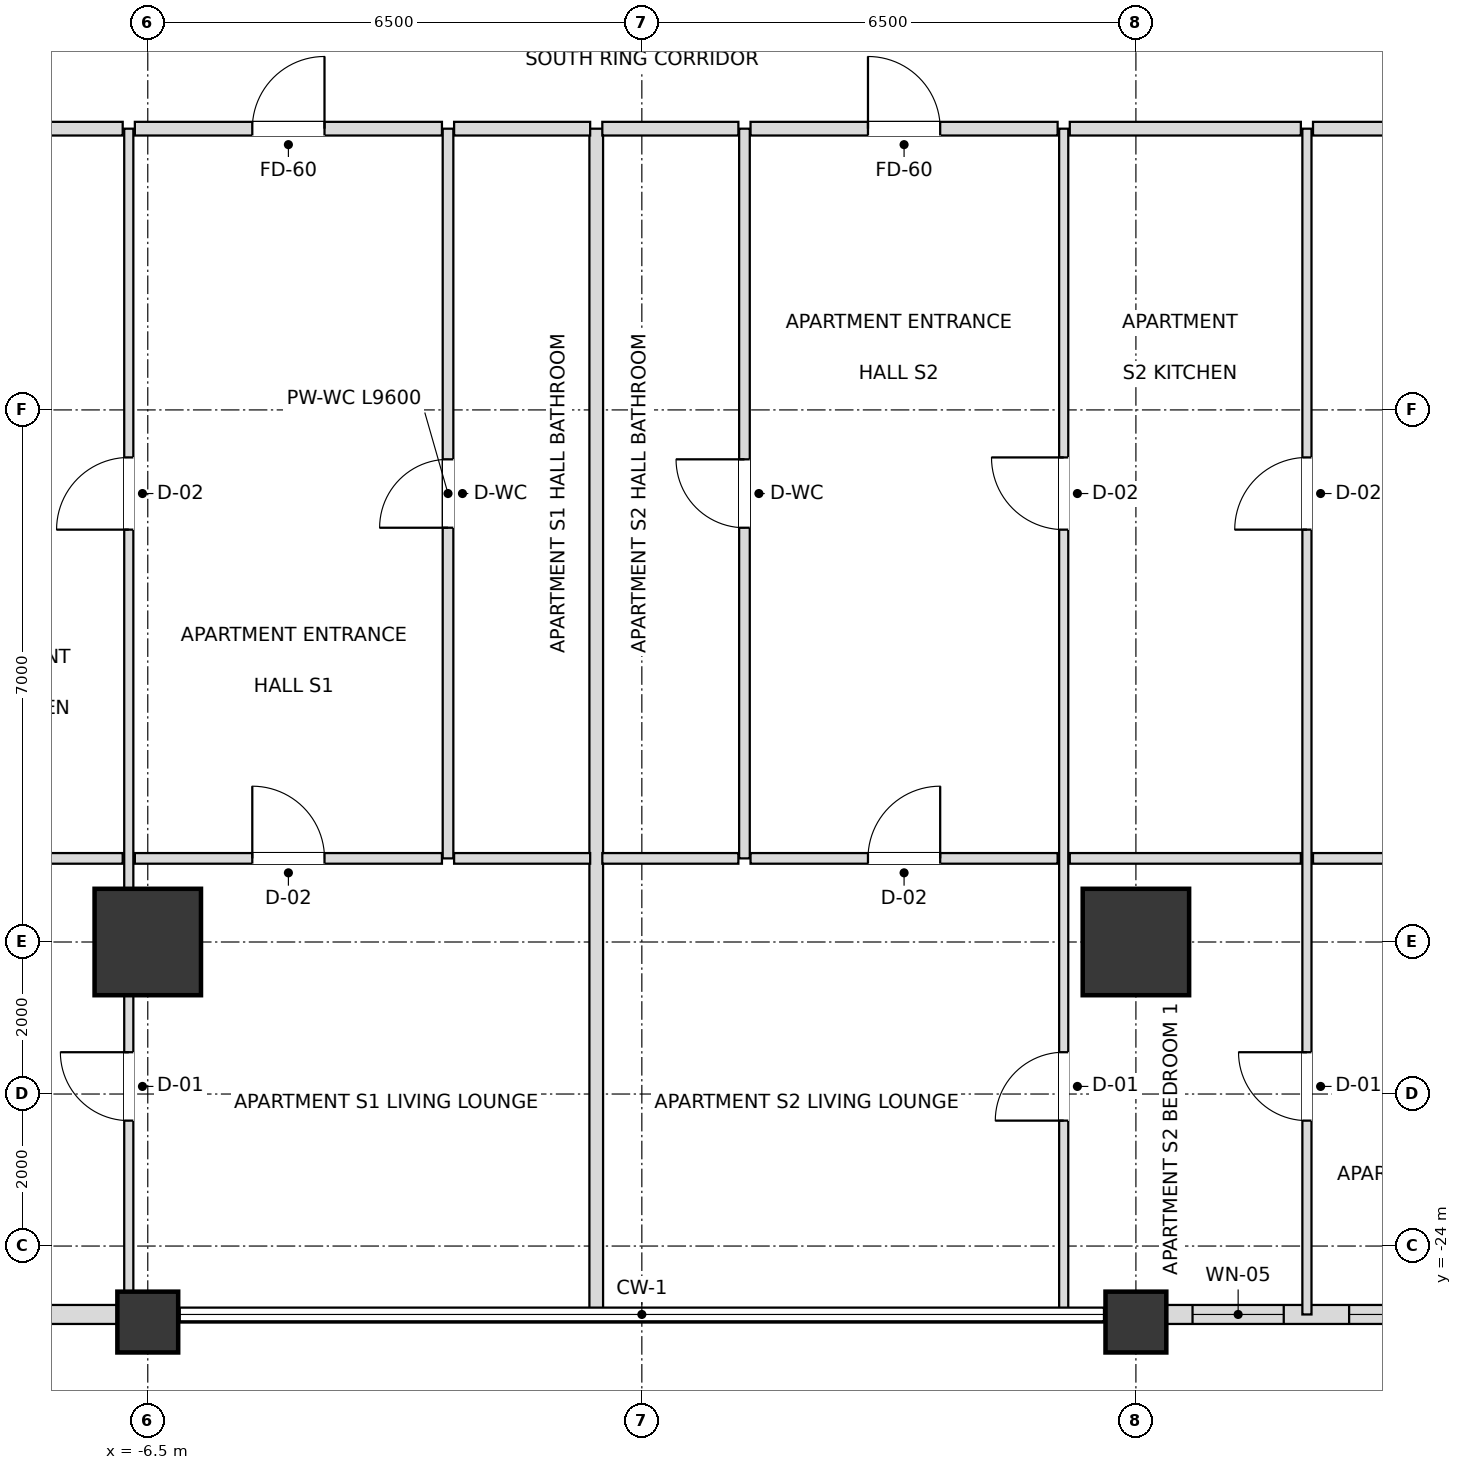
"""IFC4 building model, lengths in metres.
Left out: names, types, materials, properties, quantities, classifications, styles, units other than length and angle.
Written with IfcOpenShell. Run it as: python <this file> out.ifc"""

import sys

from ifc_helpers import new_model, si_unit, direction, frame, frame_2d, origin, origin_2d, place, context, subcontext, project, spatial, rectangle, extrude, element, fill, save


model = new_model("IFC4")
c1 = context("Model", 3, precision=1e-05, world=origin(), true_north=direction((0.0, 1.0)))
c2 = subcontext(c1, "Body", "Model", "MODEL_VIEW")
j1 = project(units=[si_unit("LENGTHUNIT", "METRE"), si_unit("PLANEANGLEUNIT", "RADIAN")], contexts=[c1])
p1 = place(None, origin())
s1 = spatial("IfcSite", under=j1, at=p1, CompositionType="ELEMENT")
p2 = place(p1, origin())
s2 = spatial("IfcBuilding", under=s1, at=p2, CompositionType="ELEMENT")
p3 = place(p2, frame((0.0, 0.0, 68.4)))
s3 = spatial("IfcBuildingStorey", under=s2, at=p3, CompositionType="ELEMENT", Elevation=68.4)
for number, where, z_axis, x_axis in (
    (1, (-6.5, -20.0, 0.0), (0.0, 0.0, 1.0), (1.0, 0.0, 0.0)),
    (2, (6.5, -20.0, 0.0), (0.0, 0.0, 1.0), (1.0, 0.0, 0.0)),
):
    element("IfcColumn", number, at=place(p3, frame(where, z_axis=z_axis, x_axis=x_axis)), inside=s3, PredefinedType="USERDEFINED", context=c2, shape_type="SweptSolid", body=[
        extrude(rectangle(XDim=1.4, YDim=1.4, at=origin_2d()), origin(), (0.0, 0.0, 1.0), 3.6),
    ])
for number, where, z_axis, x_axis in (
    (3, (-6.5, -25.0, 0.0), (0.0, 0.0, 1.0), (1.0, 0.0, 0.0)),
    (4, (6.5, -25.0, 0.0), (0.0, 0.0, 1.0), (1.0, 0.0, 0.0)),
):
    element("IfcColumn", number, at=place(p3, frame(where, z_axis=z_axis, x_axis=x_axis)), inside=s3, PredefinedType="COLUMN", context=c2, shape_type="SweptSolid", body=[
        extrude(rectangle(XDim=0.8, YDim=0.8, at=origin_2d()), origin(), (0.0, 0.0, 1.0), 3.6),
    ])
p4 = place(p3, frame((-11.105, -24.9, 0.0), z_axis=(0.0, 0.0, 1.0), x_axis=(1.0, 0.0, 0.0)))
e5 = element("IfcWall", 5, at=p4, inside=s3, PredefinedType="SOLIDWALL", context=c2, shape_type="SweptSolid", body=[
    extrude(rectangle(XDim=4.21, YDim=0.25, at=frame_2d((2.105, 0.0))), origin(), (0.0, 0.0, 1.0), 2.736),
])
p5 = place(p4, frame((1.205, 0.0, 0.72)))
e6 = element("IfcOpeningElement", 6, at=p5, cuts=e5, PredefinedType="OPENING", context=c2, shape_type="SweptSolid", body=[
    extrude(rectangle(XDim=1.8, YDim=1.68, at=frame_2d((0.9, 0.84))), frame((0.0, 0.135, 0.0), z_axis=(0.0, -1.0, 0.0), x_axis=(1.0, 0.0, 0.0)), (0.0, 0.0, 1.0), 0.27),
])
p6 = place(p3, frame((6.895, -24.9, 0.0), z_axis=(0.0, 0.0, 1.0), x_axis=(1.0, 0.0, 0.0)))
e7 = element("IfcWall", 7, at=p6, inside=s3, PredefinedType="SOLIDWALL", context=c2, shape_type="SweptSolid", body=[
    extrude(rectangle(XDim=4.21, YDim=0.25, at=frame_2d((2.105, 0.0))), origin(), (0.0, 0.0, 1.0), 2.736),
])
p7 = place(p6, frame((0.35, 0.0, 0.72)))
e8 = element("IfcOpeningElement", 8, at=p7, cuts=e7, PredefinedType="OPENING", context=c2, shape_type="SweptSolid", body=[
    extrude(rectangle(XDim=1.2, YDim=1.68, at=frame_2d((0.6, 0.84))), frame((0.0, 0.135, 0.0), z_axis=(0.0, -1.0, 0.0), x_axis=(1.0, 0.0, 0.0)), (0.0, 0.0, 1.0), 0.27),
])
p8 = place(p6, frame((2.41, 0.0, 0.72)))
e9 = element("IfcOpeningElement", 9, at=p8, cuts=e7, PredefinedType="OPENING", context=c2, shape_type="SweptSolid", body=[
    extrude(rectangle(XDim=1.2, YDim=1.68, at=frame_2d((0.6, 0.84))), frame((0.0, 0.135, 0.0), z_axis=(0.0, -1.0, 0.0), x_axis=(1.0, 0.0, 0.0)), (0.0, 0.0, 1.0), 0.27),
])
p9 = place(p3, frame((-6.75, -24.9, 0.0), z_axis=(0.0, 0.0, 1.0), x_axis=(0.0, 1.0, 0.0)))
e10 = element("IfcWall", 10, at=p9, inside=s3, PredefinedType="PARTITIONING", context=c2, shape_type="SweptSolid", body=[
    extrude(rectangle(XDim=15.6, YDim=0.12, at=frame_2d((7.8, 0.0))), origin(), (0.0, 0.0, 1.0), 2.816),
])
p10 = place(p9, frame((10.325, 0.0, 0.0)))
e11 = element("IfcOpeningElement", 11, at=p10, cuts=e10, PredefinedType="OPENING", context=c2, shape_type="SweptSolid", body=[
    extrude(rectangle(XDim=0.95, YDim=2.1, at=frame_2d((0.475, 1.05))), frame((0.0, 0.07, 0.0), z_axis=(0.0, -1.0, 0.0), x_axis=(1.0, 0.0, 0.0)), (0.0, 0.0, 1.0), 0.14),
])
p11 = place(p9, frame((2.55, 0.0, 0.0)))
e12 = element("IfcOpeningElement", 12, at=p11, cuts=e10, PredefinedType="OPENING", context=c2, shape_type="SweptSolid", body=[
    extrude(rectangle(XDim=0.9, YDim=2.1, at=frame_2d((0.45, 1.05))), frame((0.0, 0.07, 0.0), z_axis=(0.0, -1.0, 0.0), x_axis=(1.0, 0.0, 0.0)), (0.0, 0.0, 1.0), 0.14),
])
p12 = place(p3, frame((-2.55, -18.9, 0.0), z_axis=(0.0, 0.0, 1.0), x_axis=(0.0, 1.0, 0.0)))
e13 = element("IfcWall", 13, at=p12, inside=s3, PredefinedType="PARTITIONING", context=c2, shape_type="SweptSolid", body=[
    extrude(rectangle(XDim=9.6, YDim=0.14, at=frame_2d((4.8, 0.0))), origin(), (0.0, 0.0, 1.0), 2.948),
])
p13 = place(p12, frame((4.35, 0.0, 0.0)))
e14 = element("IfcOpeningElement", 14, at=p13, cuts=e13, PredefinedType="OPENING", context=c2, shape_type="SweptSolid", body=[
    extrude(rectangle(XDim=0.9, YDim=2.1, at=frame_2d((0.45, 1.05))), frame((0.0, 0.08, 0.0), z_axis=(0.0, -1.0, 0.0), x_axis=(1.0, 0.0, 0.0)), (0.0, 0.0, 1.0), 0.16),
])
p14 = place(p3, frame((-0.6, -24.9, 0.0), z_axis=(0.0, 0.0, 1.0), x_axis=(0.0, 1.0, 0.0)))
e15 = element("IfcWall", 15, at=p14, inside=s3, PredefinedType="PARTITIONING", context=c2, shape_type="SweptSolid", body=[
    extrude(rectangle(XDim=15.6, YDim=0.18, at=frame_2d((7.8, 0.0))), origin(), (0.0, 0.0, 1.0), 2.816),
])
p15 = place(p3, frame((1.35, -18.9, 0.0), z_axis=(0.0, 0.0, 1.0), x_axis=(0.0, 1.0, 0.0)))
e16 = element("IfcWall", 16, at=p15, inside=s3, PredefinedType="PARTITIONING", context=c2, shape_type="SweptSolid", body=[
    extrude(rectangle(XDim=9.6, YDim=0.14, at=frame_2d((4.8, 0.0))), origin(), (0.0, 0.0, 1.0), 2.948),
])
p16 = place(p15, frame((4.35, 0.0, 0.0)))
e17 = element("IfcOpeningElement", 17, at=p16, cuts=e16, PredefinedType="OPENING", context=c2, shape_type="SweptSolid", body=[
    extrude(rectangle(XDim=0.9, YDim=2.1, at=frame_2d((0.45, 1.05))), frame((0.0, 0.08, 0.0), z_axis=(0.0, -1.0, 0.0), x_axis=(1.0, 0.0, 0.0)), (0.0, 0.0, 1.0), 0.16),
])
p17 = place(p3, frame((5.55, -24.9, 0.0), z_axis=(0.0, 0.0, 1.0), x_axis=(0.0, 1.0, 0.0)))
e18 = element("IfcWall", 18, at=p17, inside=s3, PredefinedType="PARTITIONING", context=c2, shape_type="SweptSolid", body=[
    extrude(rectangle(XDim=15.6, YDim=0.12, at=frame_2d((7.8, 0.0))), origin(), (0.0, 0.0, 1.0), 2.816),
])
p18 = place(p17, frame((10.325, 0.0, 0.0)))
e19 = element("IfcOpeningElement", 19, at=p18, cuts=e18, PredefinedType="OPENING", context=c2, shape_type="SweptSolid", body=[
    extrude(rectangle(XDim=0.95, YDim=2.1, at=frame_2d((0.475, 1.05))), frame((0.0, 0.07, 0.0), z_axis=(0.0, -1.0, 0.0), x_axis=(1.0, 0.0, 0.0)), (0.0, 0.0, 1.0), 0.14),
])
p19 = place(p17, frame((2.55, 0.0, 0.0)))
e20 = element("IfcOpeningElement", 20, at=p19, cuts=e18, PredefinedType="OPENING", context=c2, shape_type="SweptSolid", body=[
    extrude(rectangle(XDim=0.9, YDim=2.1, at=frame_2d((0.45, 1.05))), frame((0.0, 0.07, 0.0), z_axis=(0.0, -1.0, 0.0), x_axis=(1.0, 0.0, 0.0)), (0.0, 0.0, 1.0), 0.14),
])
p20 = place(p3, frame((8.75, -24.9, 0.0), z_axis=(0.0, 0.0, 1.0), x_axis=(0.0, 1.0, 0.0)))
e21 = element("IfcWall", 21, at=p20, inside=s3, PredefinedType="PARTITIONING", context=c2, shape_type="SweptSolid", body=[
    extrude(rectangle(XDim=15.6, YDim=0.12, at=frame_2d((7.8, 0.0))), origin(), (0.0, 0.0, 1.0), 2.816),
])
p21 = place(p20, frame((10.325, 0.0, 0.0)))
e22 = element("IfcOpeningElement", 22, at=p21, cuts=e21, PredefinedType="OPENING", context=c2, shape_type="SweptSolid", body=[
    extrude(rectangle(XDim=0.95, YDim=2.1, at=frame_2d((0.475, 1.05))), frame((0.0, 0.07, 0.0), z_axis=(0.0, -1.0, 0.0), x_axis=(1.0, 0.0, 0.0)), (0.0, 0.0, 1.0), 0.14),
])
p22 = place(p20, frame((2.55, 0.0, 0.0)))
e23 = element("IfcOpeningElement", 23, at=p22, cuts=e21, PredefinedType="OPENING", context=c2, shape_type="SweptSolid", body=[
    extrude(rectangle(XDim=0.9, YDim=2.1, at=frame_2d((0.45, 1.05))), frame((0.0, 0.07, 0.0), z_axis=(0.0, -1.0, 0.0), x_axis=(1.0, 0.0, 0.0)), (0.0, 0.0, 1.0), 0.14),
])
p23 = place(p3, frame((-9.87, -18.9, 0.0), z_axis=(0.0, 0.0, 1.0), x_axis=(1.0, 0.0, 0.0)))
e24 = element("IfcWall", 24, at=p23, inside=s3, PredefinedType="PARTITIONING", context=c2, shape_type="SweptSolid", body=[
    extrude(rectangle(XDim=3.04, YDim=0.14, at=frame_2d((1.52, 0.0))), origin(), (0.0, 0.0, 1.0), 3.38),
])
p24 = place(p3, frame((-6.67, -18.9, 0.0), z_axis=(0.0, 0.0, 1.0), x_axis=(1.0, 0.0, 0.0)))
e25 = element("IfcWall", 25, at=p24, inside=s3, PredefinedType="PARTITIONING", context=c2, shape_type="SweptSolid", body=[
    extrude(rectangle(XDim=4.04, YDim=0.14, at=frame_2d((2.02, 0.0))), origin(), (0.0, 0.0, 1.0), 2.816),
])
p25 = place(p24, frame((1.545, 0.0, 0.0)))
e26 = element("IfcOpeningElement", 26, at=p25, cuts=e25, PredefinedType="OPENING", context=c2, shape_type="SweptSolid", body=[
    extrude(rectangle(XDim=0.95, YDim=2.1, at=frame_2d((0.475, 1.05))), frame((0.0, 0.08, 0.0), z_axis=(0.0, -1.0, 0.0), x_axis=(1.0, 0.0, 0.0)), (0.0, 0.0, 1.0), 0.16),
])
for number, where, z_axis, x_axis in (
    (27, (-2.47, -18.9, 0.0), (0.0, 0.0, 1.0), (1.0, 0.0, 0.0)),
    (28, (-0.52, -18.9, 0.0), (0.0, 0.0, 1.0), (1.0, 0.0, 0.0)),
):
    element("IfcWall", number, at=place(p3, frame(where, z_axis=z_axis, x_axis=x_axis)), inside=s3, PredefinedType="PARTITIONING", context=c2, shape_type="SweptSolid", body=[
        extrude(rectangle(XDim=1.79, YDim=0.14, at=frame_2d((0.895, 0.0))), origin(), (0.0, 0.0, 1.0), 3.38),
    ])
p26 = place(p3, frame((1.43, -18.9, 0.0), z_axis=(0.0, 0.0, 1.0), x_axis=(1.0, 0.0, 0.0)))
e29 = element("IfcWall", 29, at=p26, inside=s3, PredefinedType="PARTITIONING", context=c2, shape_type="SweptSolid", body=[
    extrude(rectangle(XDim=4.04, YDim=0.14, at=frame_2d((2.02, 0.0))), origin(), (0.0, 0.0, 1.0), 3.38),
])
p27 = place(p26, frame((1.545, 0.0, 0.0)))
e30 = element("IfcOpeningElement", 30, at=p27, cuts=e29, PredefinedType="OPENING", context=c2, shape_type="SweptSolid", body=[
    extrude(rectangle(XDim=0.95, YDim=2.1, at=frame_2d((0.475, 1.05))), frame((0.0, 0.08, 0.0), z_axis=(0.0, -1.0, 0.0), x_axis=(1.0, 0.0, 0.0)), (0.0, 0.0, 1.0), 0.16),
])
p28 = place(p3, frame((5.63, -18.9, 0.0), z_axis=(0.0, 0.0, 1.0), x_axis=(1.0, 0.0, 0.0)))
e31 = element("IfcWall", 31, at=p28, inside=s3, PredefinedType="PARTITIONING", context=c2, shape_type="SweptSolid", body=[
    extrude(rectangle(XDim=3.04, YDim=0.14, at=frame_2d((1.52, 0.0))), origin(), (0.0, 0.0, 1.0), 2.816),
])
p29 = place(p3, frame((8.83, -18.9, 0.0), z_axis=(0.0, 0.0, 1.0), x_axis=(1.0, 0.0, 0.0)))
e32 = element("IfcWall", 32, at=p29, inside=s3, PredefinedType="PARTITIONING", context=c2, shape_type="SweptSolid", body=[
    extrude(rectangle(XDim=4.14, YDim=0.14, at=frame_2d((2.07, 0.0))), origin(), (0.0, 0.0, 1.0), 2.736),
])
p30 = place(p3, frame((-9.87, -9.3, 0.0), z_axis=(0.0, 0.0, 1.0), x_axis=(1.0, 0.0, 0.0)))
e33 = element("IfcWall", 33, at=p30, inside=s3, PredefinedType="PARTITIONING", context=c2, shape_type="SweptSolid", body=[
    extrude(rectangle(XDim=3.04, YDim=0.18, at=frame_2d((1.52, 0.0))), origin(), (0.0, 0.0, 1.0), 3.38),
])
p31 = place(p3, frame((-6.67, -9.3, 0.0), z_axis=(0.0, 0.0, 1.0), x_axis=(1.0, 0.0, 0.0)))
e34 = element("IfcWall", 34, at=p31, inside=s3, PredefinedType="PARTITIONING", context=c2, shape_type="SweptSolid", body=[
    extrude(rectangle(XDim=4.04, YDim=0.18, at=frame_2d((2.02, 0.0))), origin(), (0.0, 0.0, 1.0), 2.816),
])
p32 = place(p31, frame((1.545, 0.0, 0.0)))
e35 = element("IfcOpeningElement", 35, at=p32, cuts=e34, PredefinedType="OPENING", context=c2, shape_type="SweptSolid", body=[
    extrude(rectangle(XDim=0.95, YDim=2.15, at=frame_2d((0.475, 1.075))), frame((0.0, 0.1, 0.0), z_axis=(0.0, -1.0, 0.0), x_axis=(1.0, 0.0, 0.0)), (0.0, 0.0, 1.0), 0.2),
])
for number, where, z_axis, x_axis in (
    (36, (-2.47, -9.3, 0.0), (0.0, 0.0, 1.0), (1.0, 0.0, 0.0)),
    (37, (-0.52, -9.3, 0.0), (0.0, 0.0, 1.0), (1.0, 0.0, 0.0)),
):
    element("IfcWall", number, at=place(p3, frame(where, z_axis=z_axis, x_axis=x_axis)), inside=s3, PredefinedType="PARTITIONING", context=c2, shape_type="SweptSolid", body=[
        extrude(rectangle(XDim=1.79, YDim=0.18, at=frame_2d((0.895, 0.0))), origin(), (0.0, 0.0, 1.0), 3.38),
    ])
p33 = place(p3, frame((1.43, -9.3, 0.0), z_axis=(0.0, 0.0, 1.0), x_axis=(1.0, 0.0, 0.0)))
e38 = element("IfcWall", 38, at=p33, inside=s3, PredefinedType="PARTITIONING", context=c2, shape_type="SweptSolid", body=[
    extrude(rectangle(XDim=4.04, YDim=0.18, at=frame_2d((2.02, 0.0))), origin(), (0.0, 0.0, 1.0), 3.38),
])
p34 = place(p33, frame((1.545, 0.0, 0.0)))
e39 = element("IfcOpeningElement", 39, at=p34, cuts=e38, PredefinedType="OPENING", context=c2, shape_type="SweptSolid", body=[
    extrude(rectangle(XDim=0.95, YDim=2.15, at=frame_2d((0.475, 1.075))), frame((0.0, 0.1, 0.0), z_axis=(0.0, -1.0, 0.0), x_axis=(1.0, 0.0, 0.0)), (0.0, 0.0, 1.0), 0.2),
])
p35 = place(p3, frame((5.63, -9.3, 0.0), z_axis=(0.0, 0.0, 1.0), x_axis=(1.0, 0.0, 0.0)))
e40 = element("IfcWall", 40, at=p35, inside=s3, PredefinedType="PARTITIONING", context=c2, shape_type="SweptSolid", body=[
    extrude(rectangle(XDim=3.04, YDim=0.18, at=frame_2d((1.52, 0.0))), origin(), (0.0, 0.0, 1.0), 2.816),
])
p36 = place(p3, frame((8.83, -9.3, 0.0), z_axis=(0.0, 0.0, 1.0), x_axis=(1.0, 0.0, 0.0)))
e41 = element("IfcWall", 41, at=p36, inside=s3, PredefinedType="PARTITIONING", context=c2, shape_type="SweptSolid", body=[
    extrude(rectangle(XDim=9.49, YDim=0.18, at=frame_2d((4.745, 0.0))), origin(), (0.0, 0.0, 1.0), 2.816),
])
p37 = place(p7, origin())
e42 = element("IfcWindow", 42, at=p37, inside=s3, PartitioningType="SINGLE_PANEL", PredefinedType="WINDOW", context=c2, shape_type="SweptSolid", body=[
    extrude(rectangle(XDim=1.2, YDim=1.68, at=frame_2d((0.6, 0.84))), frame((0.0, 0.03, 0.0), z_axis=(0.0, -1.0, 0.0), x_axis=(1.0, 0.0, 0.0)), (0.0, 0.0, 1.0), 0.06),
])
fill(e8, e42)
p38 = place(p8, origin())
e43 = element("IfcWindow", 43, at=p38, inside=s3, PartitioningType="SINGLE_PANEL", PredefinedType="WINDOW", context=c2, shape_type="SweptSolid", body=[
    extrude(rectangle(XDim=1.2, YDim=1.68, at=frame_2d((0.6, 0.84))), frame((0.0, 0.03, 0.0), z_axis=(0.0, -1.0, 0.0), x_axis=(1.0, 0.0, 0.0)), (0.0, 0.0, 1.0), 0.06),
])
fill(e9, e43)
p39 = place(p13, origin())
e44 = element("IfcDoor", 44, at=p39, inside=s3, OperationType="SINGLE_SWING_LEFT", PredefinedType="DOOR", context=c2, shape_type="SweptSolid", body=[
    extrude(rectangle(XDim=0.9, YDim=2.1, at=frame_2d((0.45, 1.05))), frame((0.0, 0.025, 0.0), z_axis=(0.0, -1.0, 0.0), x_axis=(1.0, 0.0, 0.0)), (0.0, 0.0, 1.0), 0.05),
])
fill(e14, e44)
p40 = place(p32, origin())
e45 = element("IfcDoor", 45, at=p40, inside=s3, OperationType="SINGLE_SWING_RIGHT", PredefinedType="DOOR", context=c2, shape_type="SweptSolid", body=[
    extrude(rectangle(XDim=0.95, YDim=2.15, at=frame_2d((0.475, 1.075))), frame((0.0, 0.025, 0.0), z_axis=(0.0, -1.0, 0.0), x_axis=(1.0, 0.0, 0.0)), (0.0, 0.0, 1.0), 0.05),
])
fill(e35, e45)
p41 = place(p10, origin())
e46 = element("IfcDoor", 46, at=p41, inside=s3, OperationType="SINGLE_SWING_LEFT", PredefinedType="DOOR", context=c2, shape_type="SweptSolid", body=[
    extrude(rectangle(XDim=0.95, YDim=2.1, at=frame_2d((0.475, 1.05))), frame((0.0, 0.025, 0.0), z_axis=(0.0, -1.0, 0.0), x_axis=(1.0, 0.0, 0.0)), (0.0, 0.0, 1.0), 0.05),
])
fill(e11, e46)
p42 = place(p25, origin())
e47 = element("IfcDoor", 47, at=p42, inside=s3, OperationType="SINGLE_SWING_LEFT", PredefinedType="DOOR", context=c2, shape_type="SweptSolid", body=[
    extrude(rectangle(XDim=0.95, YDim=2.1, at=frame_2d((0.475, 1.05))), frame((0.0, 0.025, 0.0), z_axis=(0.0, -1.0, 0.0), x_axis=(1.0, 0.0, 0.0)), (0.0, 0.0, 1.0), 0.05),
])
fill(e26, e47)
p43 = place(p11, origin())
e48 = element("IfcDoor", 48, at=p43, inside=s3, OperationType="SINGLE_SWING_RIGHT", PredefinedType="DOOR", context=c2, shape_type="SweptSolid", body=[
    extrude(rectangle(XDim=0.9, YDim=2.1, at=frame_2d((0.45, 1.05))), frame((0.0, 0.025, 0.0), z_axis=(0.0, -1.0, 0.0), x_axis=(1.0, 0.0, 0.0)), (0.0, 0.0, 1.0), 0.05),
])
fill(e12, e48)
p44 = place(p16, origin())
e49 = element("IfcDoor", 49, at=p44, inside=s3, OperationType="SINGLE_SWING_RIGHT", PredefinedType="DOOR", context=c2, shape_type="SweptSolid", body=[
    extrude(rectangle(XDim=0.9, YDim=2.1, at=frame_2d((0.45, 1.05))), frame((0.0, 0.025, 0.0), z_axis=(0.0, -1.0, 0.0), x_axis=(1.0, 0.0, 0.0)), (0.0, 0.0, 1.0), 0.05),
])
fill(e17, e49)
p45 = place(p34, origin())
e50 = element("IfcDoor", 50, at=p45, inside=s3, OperationType="SINGLE_SWING_LEFT", PredefinedType="DOOR", context=c2, shape_type="SweptSolid", body=[
    extrude(rectangle(XDim=0.95, YDim=2.15, at=frame_2d((0.475, 1.075))), frame((0.0, 0.025, 0.0), z_axis=(0.0, -1.0, 0.0), x_axis=(1.0, 0.0, 0.0)), (0.0, 0.0, 1.0), 0.05),
])
fill(e39, e50)
p46 = place(p18, origin())
e51 = element("IfcDoor", 51, at=p46, inside=s3, OperationType="SINGLE_SWING_RIGHT", PredefinedType="DOOR", context=c2, shape_type="SweptSolid", body=[
    extrude(rectangle(XDim=0.95, YDim=2.1, at=frame_2d((0.475, 1.05))), frame((0.0, 0.025, 0.0), z_axis=(0.0, -1.0, 0.0), x_axis=(1.0, 0.0, 0.0)), (0.0, 0.0, 1.0), 0.05),
])
fill(e19, e51)
p47 = place(p21, origin())
e52 = element("IfcDoor", 52, at=p47, inside=s3, OperationType="SINGLE_SWING_LEFT", PredefinedType="DOOR", context=c2, shape_type="SweptSolid", body=[
    extrude(rectangle(XDim=0.95, YDim=2.1, at=frame_2d((0.475, 1.05))), frame((0.0, 0.025, 0.0), z_axis=(0.0, -1.0, 0.0), x_axis=(1.0, 0.0, 0.0)), (0.0, 0.0, 1.0), 0.05),
])
fill(e22, e52)
p48 = place(p27, origin())
e53 = element("IfcDoor", 53, at=p48, inside=s3, OperationType="SINGLE_SWING_RIGHT", PredefinedType="DOOR", context=c2, shape_type="SweptSolid", body=[
    extrude(rectangle(XDim=0.95, YDim=2.1, at=frame_2d((0.475, 1.05))), frame((0.0, 0.025, 0.0), z_axis=(0.0, -1.0, 0.0), x_axis=(1.0, 0.0, 0.0)), (0.0, 0.0, 1.0), 0.05),
])
fill(e30, e53)
p49 = place(p19, origin())
e54 = element("IfcDoor", 54, at=p49, inside=s3, OperationType="SINGLE_SWING_LEFT", PredefinedType="DOOR", context=c2, shape_type="SweptSolid", body=[
    extrude(rectangle(XDim=0.9, YDim=2.1, at=frame_2d((0.45, 1.05))), frame((0.0, 0.025, 0.0), z_axis=(0.0, -1.0, 0.0), x_axis=(1.0, 0.0, 0.0)), (0.0, 0.0, 1.0), 0.05),
])
fill(e20, e54)
p50 = place(p22, origin())
e55 = element("IfcDoor", 55, at=p50, inside=s3, OperationType="SINGLE_SWING_RIGHT", PredefinedType="DOOR", context=c2, shape_type="SweptSolid", body=[
    extrude(rectangle(XDim=0.9, YDim=2.1, at=frame_2d((0.45, 1.05))), frame((0.0, 0.025, 0.0), z_axis=(0.0, -1.0, 0.0), x_axis=(1.0, 0.0, 0.0)), (0.0, 0.0, 1.0), 0.05),
])
fill(e23, e55)
save(model, sys.argv[1])
